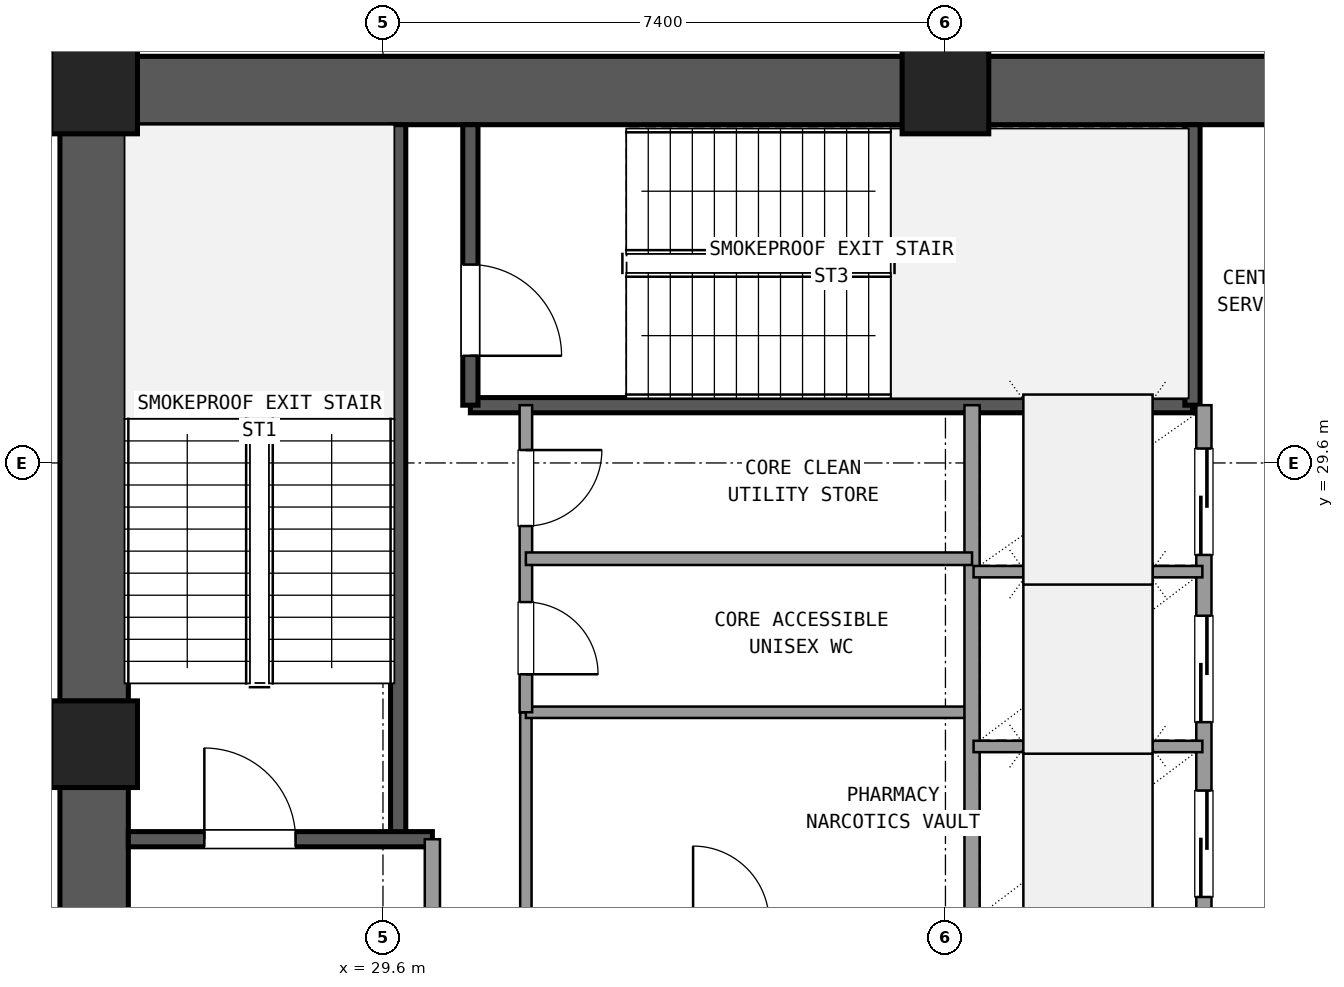
"""IFC4 building model, lengths in metres.
Left out: names, types, materials, properties, quantities, classifications, styles, units other than length and angle.
Written with IfcOpenShell. Run it as: python <this file> out.ifc"""

import sys

from ifc_helpers import new_model, si_unit, direction, frame, frame_2d, origin, origin_2d, place, context, subcontext, project, spatial, rectangle, extrude, element, fill, save


model = new_model("IFC4")
c1 = context("Model", 3, precision=1e-05, world=origin(), true_north=direction((0.0, 1.0)))
c2 = subcontext(c1, "Body", "Model", "MODEL_VIEW")
j1 = project(units=[si_unit("LENGTHUNIT", "METRE"), si_unit("PLANEANGLEUNIT", "RADIAN")], contexts=[c1])
p1 = place(None, origin())
s1 = spatial("IfcSite", under=j1, at=p1, CompositionType="ELEMENT")
p2 = place(p1, origin())
s2 = spatial("IfcBuilding", under=s1, at=p2, CompositionType="ELEMENT")
p3 = place(p2, frame((0.0, 0.0, -4.86)))
s3 = spatial("IfcBuildingStorey", under=s2, at=p3, CompositionType="ELEMENT", Elevation=-4.86)
for number, where, z_axis, x_axis in (
    (1, (37.0, 34.5, 0.0), (0.0, 0.0, 1.0), (1.0, 0.0, 0.0)),
    (2, (25.8, 34.5, 0.0), (0.0, 0.0, 1.0), (1.0, 0.0, 0.0)),
    (3, (25.8, 25.9, 0.0), (0.0, 0.0, 1.0), (1.0, 0.0, 0.0)),
):
    element("IfcColumn", number, at=place(p3, frame(where, z_axis=z_axis, x_axis=x_axis)), inside=s3, PredefinedType="COLUMN", context=c2, shape_type="SweptSolid", body=[
        extrude(rectangle(XDim=1.14, YDim=1.14, at=origin_2d()), origin(), (0.0, 0.0, 1.0), 4.86),
    ])
for number, where, z_axis, x_axis in (
    (4, (47.635, 34.5, 0.0), (0.0, 0.0, 1.0), (-1.0, 0.0, 0.0)),
    (5, (36.435, 34.5, 0.0), (0.0, 0.0, 1.0), (-1.0, 0.0, 0.0)),
):
    element("IfcWall", number, at=place(p3, frame(where, z_axis=z_axis, x_axis=x_axis)), inside=s3, PredefinedType="SHEAR", context=c2, shape_type="SweptSolid", body=[
        extrude(rectangle(XDim=10.07, YDim=0.9, at=frame_2d((5.035, 0.0))), origin(), (0.0, 0.0, 1.0), 4.56),
    ])
p4 = place(p3, frame((25.8, 33.935, 0.0), z_axis=(0.0, 0.0, 1.0), x_axis=(0.0, -1.0, 0.0)))
e6 = element("IfcWall", 6, at=p4, inside=s3, PredefinedType="SHEAR", context=c2, shape_type="SweptSolid", body=[
    extrude(rectangle(XDim=7.47, YDim=0.9, at=frame_2d((3.735, 0.0))), origin(), (0.0, 0.0, 1.0), 4.56),
])
p5 = place(p3, frame((25.8, 25.335, 0.0), z_axis=(0.0, 0.0, 1.0), x_axis=(0.0, -1.0, 0.0)))
e7 = element("IfcWall", 7, at=p5, inside=s3, PredefinedType="SHEAR", context=c2, shape_type="SweptSolid", body=[
    extrude(rectangle(XDim=7.47, YDim=0.9, at=frame_2d((3.735, 0.0))), origin(), (0.0, 0.0, 1.0), 4.56),
])
p6 = place(p5, frame((2.085, 0.0, 0.0)))
e8 = element("IfcOpeningElement", 8, at=p6, cuts=e7, PredefinedType="OPENING", context=c2, shape_type="SweptSolid", body=[
    extrude(rectangle(XDim=1.2, YDim=2.15, at=frame_2d((0.6, 1.075))), frame((0.0, 0.46, 0.0), z_axis=(0.0, -1.0, 0.0), x_axis=(1.0, 0.0, 0.0)), (0.0, 0.0, 1.0), 0.92),
])
p7 = place(p3, frame((29.8, 24.65, 0.0), z_axis=(0.0, 0.0, 1.0), x_axis=(0.0, 1.0, 0.0)))
e9 = element("IfcWall", 9, at=p7, inside=s3, PredefinedType="SHEAR", context=c2, shape_type="SweptSolid", body=[
    extrude(rectangle(XDim=9.4, YDim=0.2, at=frame_2d((4.7, 0.0))), origin(), (0.0, 0.0, 1.0), 4.56),
])
p8 = place(p3, frame((26.25, 24.65, 0.0), z_axis=(0.0, 0.0, 1.0), x_axis=(1.0, 0.0, 0.0)))
e10 = element("IfcWall", 10, at=p8, inside=s3, PredefinedType="SHEAR", context=c2, shape_type="SweptSolid", body=[
    extrude(rectangle(XDim=4.0, YDim=0.2, at=frame_2d((2.0, 0.0))), origin(), (0.0, 0.0, 1.0), 4.56),
])
p9 = place(p8, frame((1.0, 0.0, 0.0)))
e11 = element("IfcOpeningElement", 11, at=p9, cuts=e10, PredefinedType="OPENING", context=c2, shape_type="SweptSolid", body=[
    extrude(rectangle(XDim=1.2, YDim=2.15, at=frame_2d((0.6, 1.075))), frame((0.0, 0.11, 0.0), z_axis=(0.0, -1.0, 0.0), x_axis=(1.0, 0.0, 0.0)), (0.0, 0.0, 1.0), 0.22),
])
p10 = place(p3, frame((30.75, 30.36, 0.0), z_axis=(0.0, 0.0, 1.0), x_axis=(1.0, 0.0, 0.0)))
e12 = element("IfcWall", 12, at=p10, inside=s3, PredefinedType="SHEAR", context=c2, shape_type="SweptSolid", body=[
    extrude(rectangle(XDim=9.5, YDim=0.2, at=frame_2d((4.75, 0.0))), origin(), (0.0, 0.0, 1.0), 4.56),
])
p11 = place(p3, frame((30.75, 30.36, 0.0), z_axis=(0.0, 0.0, 1.0), x_axis=(0.0, 1.0, 0.0)))
e13 = element("IfcWall", 13, at=p11, inside=s3, PredefinedType="SHEAR", context=c2, shape_type="SweptSolid", body=[
    extrude(rectangle(XDim=3.69, YDim=0.2, at=frame_2d((1.845, 0.0))), origin(), (0.0, 0.0, 1.0), 4.56),
])
p12 = place(p11, frame((0.65, 0.0, 0.0)))
e14 = element("IfcOpeningElement", 14, at=p12, cuts=e13, PredefinedType="OPENING", context=c2, shape_type="SweptSolid", body=[
    extrude(rectangle(XDim=1.2, YDim=2.15, at=frame_2d((0.6, 1.075))), frame((0.0, 0.11, 0.0), z_axis=(0.0, -1.0, 0.0), x_axis=(1.0, 0.0, 0.0)), (0.0, 0.0, 1.0), 0.22),
])
p13 = place(p3, frame((40.25, 30.36, 0.0), z_axis=(0.0, 0.0, 1.0), x_axis=(0.0, 1.0, 0.0)))
e15 = element("IfcWall", 15, at=p13, inside=s3, PredefinedType="SHEAR", context=c2, shape_type="SweptSolid", body=[
    extrude(rectangle(XDim=3.69, YDim=0.2, at=frame_2d((1.845, 0.0))), origin(), (0.0, 0.0, 1.0), 4.56),
])
p14 = place(p3, frame((30.25, 17.75, 0.0), z_axis=(0.0, 0.0, 1.0), x_axis=(0.0, 1.0, 0.0)))
e16 = element("IfcWall", 16, at=p14, inside=s3, PredefinedType="SOLIDWALL", context=c2, shape_type="SweptSolid", body=[
    extrude(rectangle(XDim=6.9, YDim=0.2, at=frame_2d((3.45, 0.0))), origin(), (0.0, 0.0, 1.0), 3.85),
])
p15 = place(p14, frame((4.15, 0.0, 0.0)))
e17 = element("IfcOpeningElement", 17, at=p15, cuts=e16, PredefinedType="OPENING", context=c2, shape_type="SweptSolid", body=[
    extrude(rectangle(XDim=1.2, YDim=2.15, at=frame_2d((0.6, 1.075))), frame((0.0, 0.11, 0.0), z_axis=(0.0, -1.0, 0.0), x_axis=(1.0, 0.0, 0.0)), (0.0, 0.0, 1.0), 0.22),
])
p16 = place(p3, frame((31.48, 23.56, 0.0), z_axis=(0.0, 0.0, 1.0), x_axis=(0.0, 1.0, 0.0)))
e18 = element("IfcWall", 18, at=p16, inside=s3, PredefinedType="PARTITIONING", context=c2, shape_type="SweptSolid", body=[
    extrude(rectangle(XDim=2.76, YDim=0.15, at=frame_2d((1.38, 0.0))), origin(), (0.0, 0.0, 1.0), 3.85),
])
p17 = place(p3, frame((31.48, 26.32, 0.0), z_axis=(0.0, 0.0, 1.0), x_axis=(1.0, 0.0, 0.0)))
e19 = element("IfcWall", 19, at=p17, inside=s3, PredefinedType="PARTITIONING", context=c2, shape_type="SweptSolid", body=[
    extrude(rectangle(XDim=5.89, YDim=0.15, at=frame_2d((2.945, 0.0))), origin(), (0.0, 0.0, 1.0), 3.85),
])
p18 = place(p3, frame((37.35, 23.54, 0.0), z_axis=(0.0, 0.0, 1.0), x_axis=(0.0, 1.0, 0.0)))
e20 = element("IfcWall", 20, at=p18, inside=s3, PredefinedType="SOLIDWALL", context=c2, shape_type="SweptSolid", body=[
    extrude(rectangle(XDim=6.82, YDim=0.2, at=frame_2d((3.41, 0.0))), origin(), (0.0, 0.0, 1.0), 3.85),
])
p19 = place(p3, frame((40.4, 23.54, 0.0), z_axis=(0.0, 0.0, 1.0), x_axis=(0.0, 1.0, 0.0)))
e21 = element("IfcWall", 21, at=p19, inside=s3, PredefinedType="SOLIDWALL", context=c2, shape_type="SweptSolid", body=[
    extrude(rectangle(XDim=6.82, YDim=0.2, at=frame_2d((3.41, 0.0))), origin(), (0.0, 0.0, 1.0), 3.85),
])
p20 = place(p19, frame((0.35, 0.0, 0.0)))
e22 = element("IfcOpeningElement", 22, at=p20, cuts=e21, PredefinedType="OPENING", context=c2, shape_type="SweptSolid", body=[
    extrude(rectangle(XDim=1.4, YDim=2.2, at=frame_2d((0.7, 1.1))), frame((0.0, 0.11, 0.0), z_axis=(0.0, -1.0, 0.0), x_axis=(1.0, 0.0, 0.0)), (0.0, 0.0, 1.0), 0.22),
])
p21 = place(p19, frame((2.65, 0.0, 0.0)))
e23 = element("IfcOpeningElement", 23, at=p21, cuts=e21, PredefinedType="OPENING", context=c2, shape_type="SweptSolid", body=[
    extrude(rectangle(XDim=1.4, YDim=2.2, at=frame_2d((0.7, 1.1))), frame((0.0, 0.11, 0.0), z_axis=(0.0, -1.0, 0.0), x_axis=(1.0, 0.0, 0.0)), (0.0, 0.0, 1.0), 0.22),
])
p22 = place(p19, frame((4.85, 0.0, 0.0)))
e24 = element("IfcOpeningElement", 24, at=p22, cuts=e21, PredefinedType="OPENING", context=c2, shape_type="SweptSolid", body=[
    extrude(rectangle(XDim=1.4, YDim=2.2, at=frame_2d((0.7, 1.1))), frame((0.0, 0.11, 0.0), z_axis=(0.0, -1.0, 0.0), x_axis=(1.0, 0.0, 0.0)), (0.0, 0.0, 1.0), 0.22),
])
for number, where, z_axis, x_axis in (
    (25, (37.37, 25.87, 0.0), (0.0, 0.0, 1.0), (1.0, 0.0, 0.0)),
    (26, (37.37, 28.17, 0.0), (0.0, 0.0, 1.0), (1.0, 0.0, 0.0)),
):
    element("IfcWall", number, at=place(p3, frame(where, z_axis=z_axis, x_axis=x_axis)), inside=s3, PredefinedType="PARTITIONING", context=c2, shape_type="SweptSolid", body=[
        extrude(rectangle(XDim=3.01, YDim=0.15, at=frame_2d((1.505, 0.0))), origin(), (0.0, 0.0, 1.0), 3.85),
    ])
p23 = place(p3, frame((31.48, 26.32, 0.0), z_axis=(0.0, 0.0, 1.0), x_axis=(0.0, 1.0, 0.0)))
e27 = element("IfcWall", 27, at=p23, inside=s3, PredefinedType="PLUMBINGWALL", context=c2, shape_type="SweptSolid", body=[
    extrude(rectangle(XDim=4.04, YDim=0.165, at=frame_2d((2.02, 0.0))), origin(), (0.0, 0.0, 1.0), 3.85),
])
p24 = place(p23, frame((0.5, 0.0, 0.0)))
e28 = element("IfcOpeningElement", 28, at=p24, cuts=e27, PredefinedType="OPENING", context=c2, shape_type="SweptSolid", body=[
    extrude(rectangle(XDim=0.95, YDim=2.1, at=frame_2d((0.475, 1.05))), frame((0.0, 0.093, 0.0), z_axis=(0.0, -1.0, 0.0), x_axis=(1.0, 0.0, 0.0)), (0.0, 0.0, 1.0), 0.185),
])
p25 = place(p23, frame((2.45, 0.0, 0.0)))
e29 = element("IfcOpeningElement", 29, at=p25, cuts=e27, PredefinedType="OPENING", context=c2, shape_type="SweptSolid", body=[
    extrude(rectangle(XDim=1.0, YDim=2.15, at=frame_2d((0.5, 1.075))), frame((0.0, 0.093, 0.0), z_axis=(0.0, -1.0, 0.0), x_axis=(1.0, 0.0, 0.0)), (0.0, 0.0, 1.0), 0.185),
])
p26 = place(p3, frame((31.48, 28.34, 0.0), z_axis=(0.0, 0.0, 1.0), x_axis=(1.0, 0.0, 0.0)))
e30 = element("IfcWall", 30, at=p26, inside=s3, PredefinedType="PLUMBINGWALL", context=c2, shape_type="SweptSolid", body=[
    extrude(rectangle(XDim=5.87, YDim=0.165, at=frame_2d((2.935, 0.0))), origin(), (0.0, 0.0, 1.0), 3.85),
])
p27 = place(p9, origin())
e31 = element("IfcDoor", 31, at=p27, inside=s3, OperationType="SINGLE_SWING_LEFT", PredefinedType="DOOR", context=c2, shape_type="SweptSolid", body=[
    extrude(rectangle(XDim=1.2, YDim=2.15, at=frame_2d((0.6, 1.075))), frame((0.0, 0.025, 0.0), z_axis=(0.0, -1.0, 0.0), x_axis=(1.0, 0.0, 0.0)), (0.0, 0.0, 1.0), 0.05),
])
fill(e11, e31)
p28 = place(p20, origin())
e32 = element("IfcDoor", 32, at=p28, inside=s3, OperationType="SLIDING_TO_LEFT", PredefinedType="DOOR", context=c2, shape_type="SweptSolid", body=[
    extrude(rectangle(XDim=1.4, YDim=2.2, at=frame_2d((0.7, 1.1))), frame((0.0, 0.025, 0.0), z_axis=(0.0, -1.0, 0.0), x_axis=(1.0, 0.0, 0.0)), (0.0, 0.0, 1.0), 0.05),
])
fill(e22, e32)
p29 = place(p21, origin())
e33 = element("IfcDoor", 33, at=p29, inside=s3, OperationType="SLIDING_TO_LEFT", PredefinedType="DOOR", context=c2, shape_type="SweptSolid", body=[
    extrude(rectangle(XDim=1.4, YDim=2.2, at=frame_2d((0.7, 1.1))), frame((0.0, 0.025, 0.0), z_axis=(0.0, -1.0, 0.0), x_axis=(1.0, 0.0, 0.0)), (0.0, 0.0, 1.0), 0.05),
])
fill(e23, e33)
p30 = place(p22, origin())
e34 = element("IfcDoor", 34, at=p30, inside=s3, OperationType="SLIDING_TO_RIGHT", PredefinedType="DOOR", context=c2, shape_type="SweptSolid", body=[
    extrude(rectangle(XDim=1.4, YDim=2.2, at=frame_2d((0.7, 1.1))), frame((0.0, 0.025, 0.0), z_axis=(0.0, -1.0, 0.0), x_axis=(1.0, 0.0, 0.0)), (0.0, 0.0, 1.0), 0.05),
])
fill(e24, e34)
p31 = place(p12, frame((1.2, 0.0, 0.0), z_axis=(0.0, 0.0, 1.0), x_axis=(-1.0, 0.0, 0.0)))
e35 = element("IfcDoor", 35, at=p31, inside=s3, OperationType="SINGLE_SWING_LEFT", PredefinedType="DOOR", context=c2, shape_type="SweptSolid", body=[
    extrude(rectangle(XDim=1.2, YDim=2.15, at=frame_2d((0.6, 1.075))), frame((0.0, 0.025, 0.0), z_axis=(0.0, -1.0, 0.0), x_axis=(1.0, 0.0, 0.0)), (0.0, 0.0, 1.0), 0.05),
])
fill(e14, e35)
p32 = place(p24, frame((0.95, 0.0, 0.0), z_axis=(0.0, 0.0, 1.0), x_axis=(-1.0, 0.0, 0.0)))
e36 = element("IfcDoor", 36, at=p32, inside=s3, OperationType="SINGLE_SWING_LEFT", PredefinedType="DOOR", context=c2, shape_type="SweptSolid", body=[
    extrude(rectangle(XDim=0.95, YDim=2.1, at=frame_2d((0.475, 1.05))), frame((0.0, 0.025, 0.0), z_axis=(0.0, -1.0, 0.0), x_axis=(1.0, 0.0, 0.0)), (0.0, 0.0, 1.0), 0.05),
])
fill(e28, e36)
p33 = place(p25, frame((1.0, 0.0, 0.0), z_axis=(0.0, 0.0, 1.0), x_axis=(-1.0, 0.0, 0.0)))
e37 = element("IfcDoor", 37, at=p33, inside=s3, OperationType="SINGLE_SWING_RIGHT", PredefinedType="DOOR", context=c2, shape_type="SweptSolid", body=[
    extrude(rectangle(XDim=1.0, YDim=2.15, at=frame_2d((0.5, 1.075))), frame((0.0, 0.025, 0.0), z_axis=(0.0, -1.0, 0.0), x_axis=(1.0, 0.0, 0.0)), (0.0, 0.0, 1.0), 0.05),
])
fill(e29, e37)
save(model, sys.argv[1])
